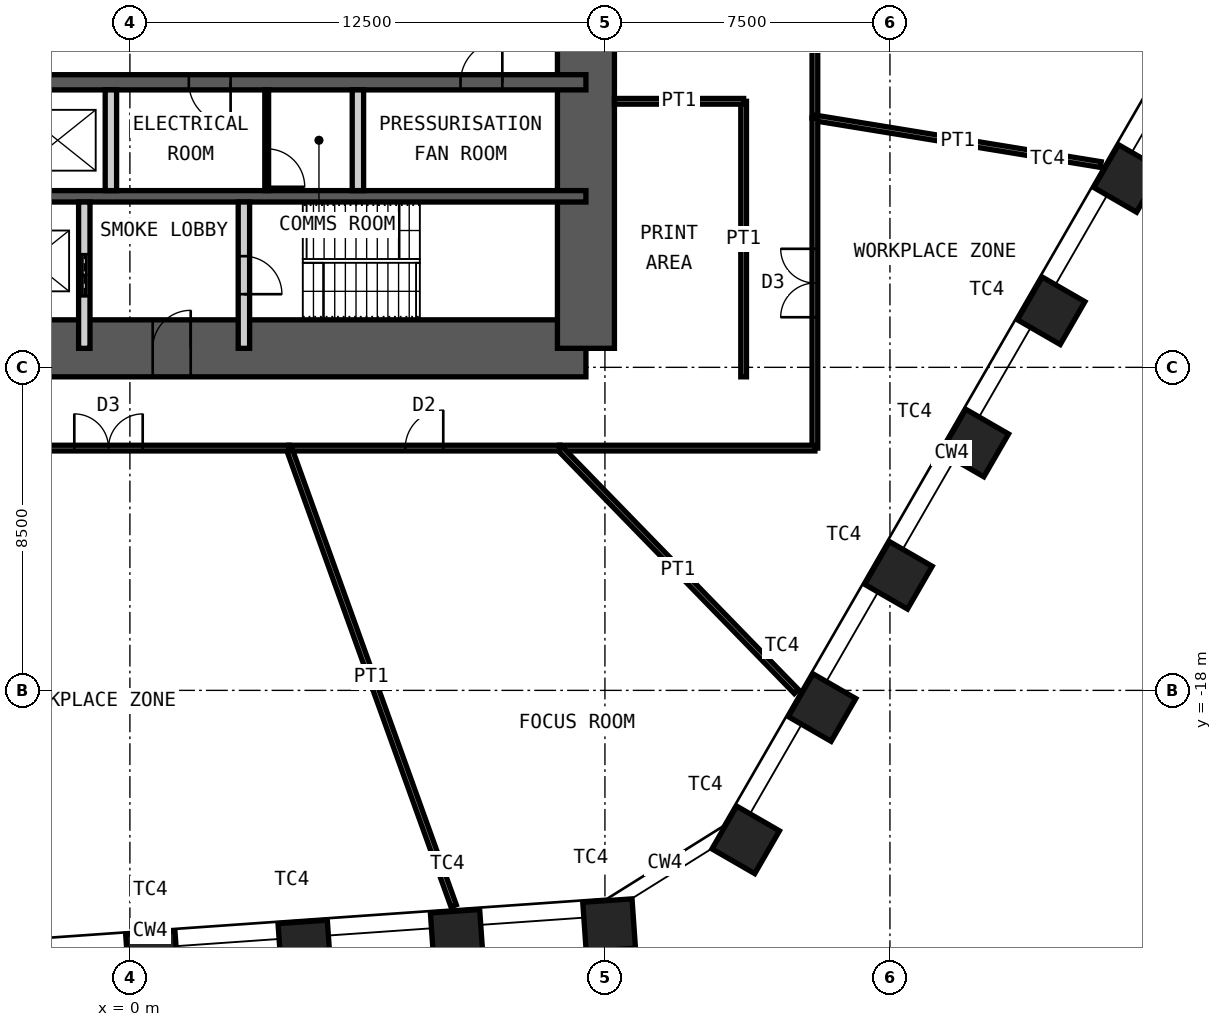
"""IFC4 building model, lengths in metres.
Left out: names, types, materials, properties, quantities, classifications, styles, units other than length and angle.
Written with IfcOpenShell. Run it as: python <this file> out.ifc"""

import sys

from ifc_helpers import new_model, si_unit, direction, frame, frame_2d, origin, origin_2d, place, context, subcontext, project, spatial, rectangle, hollow_rectangle, extrude, element, fill, save


model = new_model("IFC4")
c1 = context("Model", 3, precision=1e-05, world=origin(), true_north=direction((0.0, 1.0)))
c2 = subcontext(c1, "Body", "Model", "MODEL_VIEW")
j1 = project(units=[si_unit("LENGTHUNIT", "METRE"), si_unit("PLANEANGLEUNIT", "RADIAN")], contexts=[c1])
p1 = place(None, origin())
s1 = spatial("IfcSite", under=j1, at=p1, CompositionType="ELEMENT")
p2 = place(p1, origin())
s2 = spatial("IfcBuilding", under=s1, at=p2, CompositionType="ELEMENT")
p3 = place(p2, frame((0.0, 0.0, 153.4)))
s3 = spatial("IfcBuildingStorey", under=s2, at=p3, CompositionType="ELEMENT", Elevation=153.4)
for number, where, z_axis, x_axis in (
    (1, (26.252, -4.53, 0.0), (0.0, 0.0, 1.0), (0.5, 0.866, 0.0)),
    (2, (24.242, -8.011, 0.0), (0.0, 0.0, 1.0), (0.5, 0.866, 0.0)),
    (3, (22.233, -11.491, 0.0), (0.0, 0.0, 1.0), (0.5, 0.866, 0.0)),
    (4, (20.223, -14.972, 0.0), (0.0, 0.0, 1.0), (0.5, 0.866, 0.0)),
    (5, (18.214, -18.453, 0.0), (0.0, 0.0, 1.0), (0.5, 0.866, 0.0)),
    (6, (16.204, -21.933, 0.0), (0.0, 0.0, 1.0), (0.5, 0.866, 0.0)),
    (7, (12.61, -24.179, 0.0), (0.0, 0.0, 1.0), (0.998, 0.07, 0.0)),
    (8, (8.601, -24.46, 0.0), (0.0, 0.0, 1.0), (0.998, 0.07, 0.0)),
    (9, (4.592, -24.74, 0.0), (0.0, 0.0, 1.0), (0.998, 0.07, 0.0)),
    (10, (0.582, -25.02, 0.0), (0.0, 0.0, 1.0), (0.998, 0.07, 0.0)),
):
    element("IfcColumn", number, at=place(p3, frame(where, z_axis=z_axis, x_axis=x_axis)), inside=s3, PredefinedType="COLUMN", context=c2, shape_type="SweptSolid", body=[
        extrude(hollow_rectangle(XDim=1.3, YDim=1.3, WallThickness=0.1, at=origin_2d()), origin(), (0.0, 0.0, 1.0), 4.2),
    ])
p4 = place(p3, frame((-12.0, -9.0, 0.0), z_axis=(0.0, 0.0, 1.0), x_axis=(1.0, 0.0, 0.0)))
e11 = element("IfcWall", 11, at=p4, inside=s3, PredefinedType="SHEAR", context=c2, shape_type="SweptSolid", body=[
    extrude(rectangle(XDim=24.0, YDim=1.5, at=frame_2d((12.0, 0.0))), origin(), (0.0, 0.0, 1.0), 4.2),
])
p5 = place(p4, frame((1.35, 0.0, 0.0)))
e12 = element("IfcOpeningElement", 12, at=p5, cuts=e11, PredefinedType="OPENING", context=c2, shape_type="SweptSolid", body=[
    extrude(rectangle(XDim=1.0, YDim=2.1, at=frame_2d((0.5, 1.05))), frame((0.0, 0.76, 0.0), z_axis=(0.0, -1.0, 0.0), x_axis=(1.0, 0.0, 0.0)), (0.0, 0.0, 1.0), 1.52),
])
p6 = place(p4, frame((5.325, 0.0, 0.0)))
e13 = element("IfcOpeningElement", 13, at=p6, cuts=e11, PredefinedType="OPENING", context=c2, shape_type="SweptSolid", body=[
    extrude(rectangle(XDim=1.15, YDim=2.1, at=frame_2d((0.575, 1.05))), frame((0.0, 0.76, 0.0), z_axis=(0.0, -1.0, 0.0), x_axis=(1.0, 0.0, 0.0)), (0.0, 0.0, 1.0), 1.52),
])
p7 = place(p4, frame((12.6, 0.0, 0.0)))
e14 = element("IfcOpeningElement", 14, at=p7, cuts=e11, PredefinedType="OPENING", context=c2, shape_type="SweptSolid", body=[
    extrude(rectangle(XDim=1.0, YDim=2.1, at=frame_2d((0.5, 1.05))), frame((0.0, 0.76, 0.0), z_axis=(0.0, -1.0, 0.0), x_axis=(1.0, 0.0, 0.0)), (0.0, 0.0, 1.0), 1.52),
])
p8 = place(p3, frame((12.0, -9.0, 0.0), z_axis=(0.0, 0.0, 1.0), x_axis=(0.0, 1.0, 0.0)))
e15 = element("IfcWall", 15, at=p8, inside=s3, PredefinedType="SHEAR", context=c2, shape_type="SweptSolid", body=[
    extrude(rectangle(XDim=18.0, YDim=1.5, at=frame_2d((9.0, 0.0))), origin(), (0.0, 0.0, 1.0), 4.2),
])
p9 = place(p8, frame((8.1, 0.0, 0.0)))
e16 = element("IfcOpeningElement", 16, at=p9, cuts=e15, PredefinedType="OPENING", context=c2, shape_type="SweptSolid", body=[
    extrude(rectangle(XDim=1.8, YDim=2.1, at=frame_2d((0.9, 1.05))), frame((0.0, 0.76, 0.0), z_axis=(0.0, -1.0, 0.0), x_axis=(1.0, 0.0, 0.0)), (0.0, 0.0, 1.0), 1.52),
])
p10 = place(p3, frame((-12.0, -2.0, 0.0), z_axis=(0.0, 0.0, 1.0), x_axis=(1.0, 0.0, 0.0)))
e17 = element("IfcWall", 17, at=p10, inside=s3, PredefinedType="SHEAR", context=c2, shape_type="SweptSolid", body=[
    extrude(rectangle(XDim=24.0, YDim=0.4, at=frame_2d((12.0, 0.0))), origin(), (0.0, 0.0, 1.0), 4.2),
])
p11 = place(p10, frame((1.1, 0.0, 0.0)))
e18 = element("IfcOpeningElement", 18, at=p11, cuts=e17, PredefinedType="OPENING", context=c2, shape_type="SweptSolid", body=[
    extrude(rectangle(XDim=1.1, YDim=2.1, at=frame_2d((0.55, 1.05))), frame((0.0, 0.21, 0.0), z_axis=(0.0, -1.0, 0.0), x_axis=(1.0, 0.0, 0.0)), (0.0, 0.0, 1.0), 0.42),
])
p12 = place(p10, frame((13.55, 0.0, 0.0)))
e19 = element("IfcOpeningElement", 19, at=p12, cuts=e17, PredefinedType="OPENING", context=c2, shape_type="SweptSolid", body=[
    extrude(rectangle(XDim=1.1, YDim=2.1, at=frame_2d((0.55, 1.05))), frame((0.0, 0.21, 0.0), z_axis=(0.0, -1.0, 0.0), x_axis=(1.0, 0.0, 0.0)), (0.0, 0.0, 1.0), 0.42),
])
p13 = place(p10, frame((20.7, 0.0, 0.0)))
e20 = element("IfcOpeningElement", 20, at=p13, cuts=e17, PredefinedType="OPENING", context=c2, shape_type="SweptSolid", body=[
    extrude(rectangle(XDim=1.1, YDim=2.1, at=frame_2d((0.55, 1.05))), frame((0.0, 0.21, 0.0), z_axis=(0.0, -1.0, 0.0), x_axis=(1.0, 0.0, 0.0)), (0.0, 0.0, 1.0), 0.42),
])
p14 = place(p10, frame((4.0, 0.0, 0.0)))
e21 = element("IfcOpeningElement", 21, at=p14, cuts=e17, PredefinedType="OPENING", context=c2, shape_type="SweptSolid", body=[
    extrude(rectangle(XDim=1.0, YDim=2.1, at=frame_2d((0.5, 1.05))), frame((0.0, 0.21, 0.0), z_axis=(0.0, -1.0, 0.0), x_axis=(1.0, 0.0, 0.0)), (0.0, 0.0, 1.0), 0.42),
])
p15 = place(p3, frame((-12.0, -5.0, 0.0), z_axis=(0.0, 0.0, 1.0), x_axis=(1.0, 0.0, 0.0)))
e22 = element("IfcWall", 22, at=p15, inside=s3, PredefinedType="SHEAR", context=c2, shape_type="SweptSolid", body=[
    extrude(rectangle(XDim=24.0, YDim=0.3, at=frame_2d((12.0, 0.0))), origin(), (0.0, 0.0, 1.0), 4.2),
])
for number, where, z_axis, x_axis in (
    (23, (-0.5, -4.85, 0.0), (0.0, 0.0, 1.0), (0.0, 1.0, 0.0)),
    (24, (6.0, -4.85, 0.0), (0.0, 0.0, 1.0), (0.0, 1.0, 0.0)),
):
    element("IfcWall", number, at=place(p3, frame(where, z_axis=z_axis, x_axis=x_axis)), inside=s3, PredefinedType="PARTITIONING", context=c2, shape_type="SweptSolid", body=[
        extrude(rectangle(XDim=2.65, YDim=0.3, at=frame_2d((1.325, 0.0))), origin(), (0.0, 0.0, 1.0), 3.98),
    ])
p16 = place(p3, frame((-1.2, -9.0, 0.0), z_axis=(0.0, 0.0, 1.0), x_axis=(0.0, 1.0, 0.0)))
e25 = element("IfcWall", 25, at=p16, inside=s3, PredefinedType="PARTITIONING", context=c2, shape_type="SweptSolid", body=[
    extrude(rectangle(XDim=3.85, YDim=0.3, at=frame_2d((1.925, 0.0))), origin(), (0.0, 0.0, 1.0), 3.98),
])
p17 = place(p16, frame((1.375, 0.0, 0.0)))
e26 = element("IfcOpeningElement", 26, at=p17, cuts=e25, PredefinedType="OPENING", context=c2, shape_type="SweptSolid", body=[
    extrude(rectangle(XDim=1.1, YDim=2.4, at=frame_2d((0.55, 1.2))), frame((0.0, 0.16, 0.0), z_axis=(0.0, -1.0, 0.0), x_axis=(1.0, 0.0, 0.0)), (0.0, 0.0, 1.0), 0.32),
])
p18 = place(p3, frame((3.0, -9.0, 0.0), z_axis=(0.0, 0.0, 1.0), x_axis=(0.0, 1.0, 0.0)))
e27 = element("IfcWall", 27, at=p18, inside=s3, PredefinedType="PARTITIONING", context=c2, shape_type="SweptSolid", body=[
    extrude(rectangle(XDim=3.85, YDim=0.3, at=frame_2d((1.925, 0.0))), origin(), (0.0, 0.0, 1.0), 3.98),
])
p19 = place(p18, frame((1.425, 0.0, 0.0)))
e28 = element("IfcOpeningElement", 28, at=p19, cuts=e27, PredefinedType="OPENING", context=c2, shape_type="SweptSolid", body=[
    extrude(rectangle(XDim=1.0, YDim=2.1, at=frame_2d((0.5, 1.05))), frame((0.0, 0.16, 0.0), z_axis=(0.0, -1.0, 0.0), x_axis=(1.0, 0.0, 0.0)), (0.0, 0.0, 1.0), 0.32),
])
p20 = place(p3, frame((3.6, -4.85, 0.0), z_axis=(0.0, 0.0, 1.0), x_axis=(0.0, 1.0, 0.0)))
e29 = element("IfcWall", 29, at=p20, inside=s3, PredefinedType="PARTITIONING", context=c2, shape_type="SweptSolid", body=[
    extrude(rectangle(XDim=2.65, YDim=0.1, at=frame_2d((1.325, 0.0))), origin(), (0.0, 0.0, 1.0), 3.98),
])
p21 = place(p20, frame((0.1, 0.0, 0.0)))
e30 = element("IfcOpeningElement", 30, at=p21, cuts=e29, PredefinedType="OPENING", context=c2, shape_type="SweptSolid", body=[
    extrude(rectangle(XDim=1.0, YDim=2.4, at=frame_2d((0.5, 1.2))), frame((0.0, 0.06, 0.0), z_axis=(0.0, -1.0, 0.0), x_axis=(1.0, 0.0, 0.0)), (0.0, 0.0, 1.0), 0.12),
])
p22 = place(p3, frame((18.025, 7.267, 0.0), z_axis=(0.0, 0.0, 1.0), x_axis=(0.0, -1.0, 0.0)))
e31 = element("IfcWall", 31, at=p22, inside=s3, PredefinedType="PARTITIONING", context=c2, shape_type="SweptSolid", body=[
    extrude(rectangle(XDim=10.205, YDim=0.15, at=frame_2d((5.103, 0.0))), origin(), (0.0, 0.0, 1.0), 4.03),
])
p23 = place(p22, frame((4.203, 0.0, 0.0)))
e32 = element("IfcOpeningElement", 32, at=p23, cuts=e31, PredefinedType="OPENING", context=c2, shape_type="SweptSolid", body=[
    extrude(rectangle(XDim=1.8, YDim=2.4, at=frame_2d((0.9, 1.2))), frame((0.0, 0.085, 0.0), z_axis=(0.0, -1.0, 0.0), x_axis=(1.0, 0.0, 0.0)), (0.0, 0.0, 1.0), 0.17),
])
p24 = place(p3, frame((25.547, -4.164, 0.0), z_axis=(0.0, 0.0, 1.0), x_axis=(-0.986975470567, 0.160870819291, 0.0)))
e33 = element("IfcWall", 33, at=p24, inside=s3, PredefinedType="PARTITIONING", context=c2, shape_type="SweptSolid", body=[
    extrude(rectangle(XDim=7.622, YDim=0.15, at=frame_2d((3.811, 0.0))), origin(), (0.0, 0.0, 1.0), 4.03),
])
p25 = place(p3, frame((18.025, -2.938, 0.0), z_axis=(0.0, 0.0, 1.0), x_axis=(0.0, -1.0, 0.0)))
e34 = element("IfcWall", 34, at=p25, inside=s3, PredefinedType="PARTITIONING", context=c2, shape_type="SweptSolid", body=[
    extrude(rectangle(XDim=8.687, YDim=0.15, at=frame_2d((4.344, 0.0))), origin(), (0.0, 0.0, 1.0), 4.03),
])
p26 = place(p25, frame((3.443, 0.0, 0.0)))
e35 = element("IfcOpeningElement", 35, at=p26, cuts=e34, PredefinedType="OPENING", context=c2, shape_type="SweptSolid", body=[
    extrude(rectangle(XDim=1.8, YDim=2.4, at=frame_2d((0.9, 1.2))), frame((0.0, 0.085, 0.0), z_axis=(0.0, -1.0, 0.0), x_axis=(1.0, 0.0, 0.0)), (0.0, 0.0, 1.0), 0.17),
])
p27 = place(p3, frame((18.025, -11.625, 0.0), z_axis=(0.0, 0.0, 1.0), x_axis=(-1.0, 0.0, 0.0)))
e36 = element("IfcWall", 36, at=p27, inside=s3, PredefinedType="PARTITIONING", context=c2, shape_type="SweptSolid", body=[
    extrude(rectangle(XDim=6.718, YDim=0.15, at=frame_2d((3.359, 0.0))), origin(), (0.0, 0.0, 1.0), 4.03),
])
p28 = place(p3, frame((17.538, -18.031, 0.0), z_axis=(0.0, 0.0, 1.0), x_axis=(-0.697230918085, 0.716846599257, 0.0)))
e37 = element("IfcWall", 37, at=p28, inside=s3, PredefinedType="PARTITIONING", context=c2, shape_type="SweptSolid", body=[
    extrude(rectangle(XDim=8.936, YDim=0.15, at=frame_2d((4.468, 0.0))), origin(), (0.0, 0.0, 1.0), 3.33),
])
p29 = place(p3, frame((11.307, -11.625, 0.0), z_axis=(0.0, 0.0, 1.0), x_axis=(-1.0, 0.0, 0.0)))
e38 = element("IfcWall", 38, at=p29, inside=s3, PredefinedType="PARTITIONING", context=c2, shape_type="SweptSolid", body=[
    extrude(rectangle(XDim=7.123, YDim=0.15, at=frame_2d((3.562, 0.0))), origin(), (0.0, 0.0, 1.0), 4.03),
])
p30 = place(p29, frame((3.062, 0.0, 0.0)))
e39 = element("IfcOpeningElement", 39, at=p30, cuts=e38, PredefinedType="OPENING", context=c2, shape_type="SweptSolid", body=[
    extrude(rectangle(XDim=1.0, YDim=2.4, at=frame_2d((0.5, 1.2))), frame((0.0, 0.085, 0.0), z_axis=(0.0, -1.0, 0.0), x_axis=(1.0, 0.0, 0.0)), (0.0, 0.0, 1.0), 0.17),
])
p31 = place(p3, frame((8.518, -23.667, 0.0), z_axis=(0.0, 0.0, 1.0), x_axis=(-0.338635030469, 0.940917805198, 0.0)))
e40 = element("IfcWall", 40, at=p31, inside=s3, PredefinedType="PARTITIONING", context=c2, shape_type="SweptSolid", body=[
    extrude(rectangle(XDim=12.798, YDim=0.15, at=frame_2d((6.399, 0.0))), origin(), (0.0, 0.0, 1.0), 3.33),
])
p32 = place(p3, frame((4.184, -11.625, 0.0), z_axis=(0.0, 0.0, 1.0), x_axis=(-1.0, 0.0, 0.0)))
e41 = element("IfcWall", 41, at=p32, inside=s3, PredefinedType="PARTITIONING", context=c2, shape_type="SweptSolid", body=[
    extrude(rectangle(XDim=9.494, YDim=0.15, at=frame_2d((4.747, 0.0))), origin(), (0.0, 0.0, 1.0), 4.03),
])
p33 = place(p32, frame((3.847, 0.0, 0.0)))
e42 = element("IfcOpeningElement", 42, at=p33, cuts=e41, PredefinedType="OPENING", context=c2, shape_type="SweptSolid", body=[
    extrude(rectangle(XDim=1.8, YDim=2.4, at=frame_2d((0.9, 1.2))), frame((0.0, 0.085, 0.0), z_axis=(0.0, -1.0, 0.0), x_axis=(1.0, 0.0, 0.0)), (0.0, 0.0, 1.0), 0.17),
])
p34 = place(p3, frame((16.15, -9.75, 0.0), z_axis=(0.0, 0.0, 1.0), x_axis=(0.0, 1.0, 0.0)))
e43 = element("IfcWall", 43, at=p34, inside=s3, PredefinedType="PARTITIONING", context=c2, shape_type="SweptSolid", body=[
    extrude(rectangle(XDim=7.25, YDim=0.15, at=frame_2d((3.625, 0.0))), origin(), (0.0, 0.0, 1.0), 4.03),
])
p35 = place(p3, frame((12.75, -2.5, 0.0), z_axis=(0.0, 0.0, 1.0), x_axis=(1.0, 0.0, 0.0)))
e44 = element("IfcWall", 44, at=p35, inside=s3, PredefinedType="PARTITIONING", context=c2, shape_type="SweptSolid", body=[
    extrude(rectangle(XDim=3.4, YDim=0.15, at=frame_2d((1.7, 0.0))), origin(), (0.0, 0.0, 1.0), 3.33),
])
p36 = place(p7, origin())
e45 = element("IfcDoor", 45, at=p36, inside=s3, OperationType="SINGLE_SWING_LEFT", PredefinedType="DOOR", context=c2, shape_type="SweptSolid", body=[
    extrude(rectangle(XDim=1.0, YDim=2.1, at=frame_2d((0.5, 1.05))), frame((0.0, 0.025, 0.0), z_axis=(0.0, -1.0, 0.0), x_axis=(1.0, 0.0, 0.0)), (0.0, 0.0, 1.0), 0.05),
])
fill(e14, e45)
p37 = place(p19, origin())
e46 = element("IfcDoor", 46, at=p37, inside=s3, OperationType="SINGLE_SWING_LEFT", PredefinedType="DOOR", context=c2, shape_type="SweptSolid", body=[
    extrude(rectangle(XDim=1.0, YDim=2.1, at=frame_2d((0.5, 1.05))), frame((0.0, 0.025, 0.0), z_axis=(0.0, -1.0, 0.0), x_axis=(1.0, 0.0, 0.0)), (0.0, 0.0, 1.0), 0.05),
])
fill(e28, e46)
p38 = place(p12, origin())
e47 = element("IfcDoor", 47, at=p38, inside=s3, OperationType="SINGLE_SWING_RIGHT", PredefinedType="DOOR", context=c2, shape_type="SweptSolid", body=[
    extrude(rectangle(XDim=1.1, YDim=2.1, at=frame_2d((0.55, 1.05))), frame((0.0, 0.025, 0.0), z_axis=(0.0, -1.0, 0.0), x_axis=(1.0, 0.0, 0.0)), (0.0, 0.0, 1.0), 0.05),
])
fill(e19, e47)
p39 = place(p13, origin())
e48 = element("IfcDoor", 48, at=p39, inside=s3, OperationType="SINGLE_SWING_LEFT", PredefinedType="DOOR", context=c2, shape_type="SweptSolid", body=[
    extrude(rectangle(XDim=1.1, YDim=2.1, at=frame_2d((0.55, 1.05))), frame((0.0, 0.025, 0.0), z_axis=(0.0, -1.0, 0.0), x_axis=(1.0, 0.0, 0.0)), (0.0, 0.0, 1.0), 0.05),
])
fill(e20, e48)
p40 = place(p17, origin())
e49 = element("IfcDoor", 49, at=p40, inside=s3, OperationType="DOUBLE_DOOR_SLIDING", PredefinedType="DOOR", context=c2, shape_type="SweptSolid", body=[
    extrude(rectangle(XDim=1.1, YDim=2.4, at=frame_2d((0.55, 1.2))), frame((0.0, 0.025, 0.0), z_axis=(0.0, -1.0, 0.0), x_axis=(1.0, 0.0, 0.0)), (0.0, 0.0, 1.0), 0.05),
])
fill(e26, e49)
p41 = place(p21, origin())
e50 = element("IfcDoor", 50, at=p41, inside=s3, OperationType="SINGLE_SWING_LEFT", PredefinedType="DOOR", context=c2, shape_type="SweptSolid", body=[
    extrude(rectangle(XDim=1.0, YDim=2.4, at=frame_2d((0.5, 1.2))), frame((0.0, 0.025, 0.0), z_axis=(0.0, -1.0, 0.0), x_axis=(1.0, 0.0, 0.0)), (0.0, 0.0, 1.0), 0.05),
])
fill(e30, e50)
p42 = place(p26, origin())
e51 = element("IfcDoor", 51, at=p42, inside=s3, OperationType="DOUBLE_DOOR_DOUBLE_SWING", PredefinedType="DOOR", context=c2, shape_type="SweptSolid", body=[
    extrude(rectangle(XDim=1.8, YDim=2.4, at=frame_2d((0.9, 1.2))), frame((0.0, 0.025, 0.0), z_axis=(0.0, -1.0, 0.0), x_axis=(1.0, 0.0, 0.0)), (0.0, 0.0, 1.0), 0.05),
])
fill(e35, e51)
p43 = place(p30, origin())
e52 = element("IfcDoor", 52, at=p43, inside=s3, OperationType="SINGLE_SWING_LEFT", PredefinedType="DOOR", context=c2, shape_type="SweptSolid", body=[
    extrude(rectangle(XDim=1.0, YDim=2.4, at=frame_2d((0.5, 1.2))), frame((0.0, 0.025, 0.0), z_axis=(0.0, -1.0, 0.0), x_axis=(1.0, 0.0, 0.0)), (0.0, 0.0, 1.0), 0.05),
])
fill(e39, e52)
p44 = place(p33, origin())
e53 = element("IfcDoor", 53, at=p44, inside=s3, OperationType="DOUBLE_DOOR_DOUBLE_SWING", PredefinedType="DOOR", context=c2, shape_type="SweptSolid", body=[
    extrude(rectangle(XDim=1.8, YDim=2.4, at=frame_2d((0.9, 1.2))), frame((0.0, 0.025, 0.0), z_axis=(0.0, -1.0, 0.0), x_axis=(1.0, 0.0, 0.0)), (0.0, 0.0, 1.0), 0.05),
])
fill(e42, e53)
save(model, sys.argv[1])
